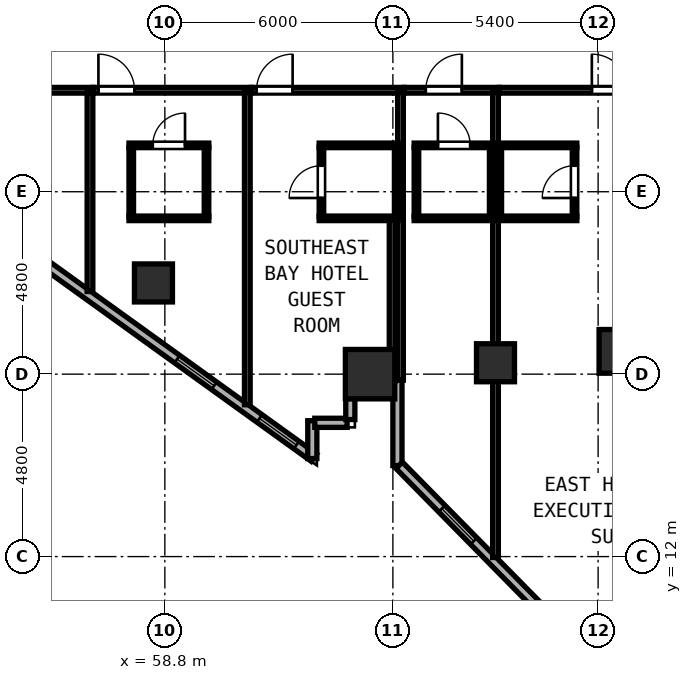
"""IFC4 building model, lengths in metres.
Left out: names, types, materials, properties, quantities, classifications, styles, units other than length and angle.
Written with IfcOpenShell. Run it as: python <this file> out.ifc"""

import sys

from ifc_helpers import new_model, si_unit, direction, frame, frame_2d, origin, origin_2d, place, context, subcontext, project, spatial, rectangle, hollow_rectangle, extrude, element, fill, save


model = new_model("IFC4")
c1 = context("Model", 3, precision=1e-05, world=origin(), true_north=direction((0.0, 1.0)))
c2 = subcontext(c1, "Body", "Model", "MODEL_VIEW")
j1 = project(units=[si_unit("LENGTHUNIT", "METRE"), si_unit("PLANEANGLEUNIT", "RADIAN")], contexts=[c1])
p1 = place(None, origin())
s1 = spatial("IfcSite", under=j1, at=p1, CompositionType="ELEMENT")
p2 = place(p1, origin())
s2 = spatial("IfcBuilding", under=s1, at=p2, CompositionType="ELEMENT")
p3 = place(p2, frame((0.0, 0.0, 39.2)))
s3 = spatial("IfcBuildingStorey", under=s2, at=p3, CompositionType="ELEMENT", Elevation=39.2)
p4 = place(p3, frame((64.2, 16.8, 0.0), z_axis=(0.0, 0.0, 1.0), x_axis=(1.0, 0.0, 0.0)))
e1 = element("IfcColumn", 1, at=p4, inside=s3, PredefinedType="COLUMN", context=c2, shape_type="SweptSolid", body=[
    extrude(hollow_rectangle(XDim=1.3, YDim=1.3, WallThickness=0.048, at=origin_2d()), origin(), (0.0, 0.0, 1.0), 3.8),
])
p5 = place(p3, frame((70.8, 17.4, 0.0), z_axis=(0.0, 0.0, 1.0), x_axis=(1.0, 0.0, 0.0)))
e2 = element("IfcColumn", 2, at=p5, inside=s3, PredefinedType="COLUMN", context=c2, shape_type="SweptSolid", body=[
    extrude(hollow_rectangle(XDim=1.15, YDim=1.15, WallThickness=0.042, at=origin_2d()), origin(), (0.0, 0.0, 1.0), 3.8),
])
for number, where, z_axis, x_axis in (
    (3, (58.5, 19.2, 0.0), (0.0, 0.0, 1.0), (1.0, 0.0, 0.0)),
    (4, (67.5, 17.1, 0.0), (0.0, 0.0, 1.0), (1.0, 0.0, 0.0)),
):
    element("IfcColumn", number, at=place(p3, frame(where, z_axis=z_axis, x_axis=x_axis)), inside=s3, PredefinedType="COLUMN", context=c2, shape_type="SweptSolid", body=[
        extrude(hollow_rectangle(XDim=1.0, YDim=1.0, WallThickness=0.038, at=origin_2d()), origin(), (0.0, 0.0, 1.0), 3.8),
    ])
p6 = place(p3, frame((53.442, 21.286, 0.0), z_axis=(0.0, 0.0, 1.0), x_axis=(0.811542842993, -0.584292917967, 0.0)))
e5 = element("IfcWall", 5, at=p6, inside=s3, PredefinedType="SOLIDWALL", context=c2, shape_type="SweptSolid", body=[
    extrude(rectangle(XDim=11.438, YDim=0.24, at=frame_2d((5.719, 0.0))), origin(), (0.0, 0.0, 1.0), 3.037),
])
p7 = place(p6, frame((1.6, 0.0, 0.85)))
e6 = element("IfcOpeningElement", 6, at=p7, cuts=e5, PredefinedType="OPENING", context=c2, shape_type="SweptSolid", body=[
    extrude(rectangle(XDim=1.2, YDim=1.85, at=frame_2d((0.6, 0.925))), frame((0.0, 0.13, 0.0), z_axis=(0.0, -1.0, 0.0), x_axis=(1.0, 0.0, 0.0)), (0.0, 0.0, 1.0), 0.26),
])
p8 = place(p6, frame((7.0, 0.0, 0.85)))
e7 = element("IfcOpeningElement", 7, at=p8, cuts=e5, PredefinedType="OPENING", context=c2, shape_type="SweptSolid", body=[
    extrude(rectangle(XDim=1.2, YDim=1.85, at=frame_2d((0.6, 0.925))), frame((0.0, 0.13, 0.0), z_axis=(0.0, -1.0, 0.0), x_axis=(1.0, 0.0, 0.0)), (0.0, 0.0, 1.0), 0.26),
])
p9 = place(p6, frame((9.669, 0.0, 0.85)))
e8 = element("IfcOpeningElement", 8, at=p9, cuts=e5, PredefinedType="OPENING", context=c2, shape_type="SweptSolid", body=[
    extrude(rectangle(XDim=1.2, YDim=1.85, at=frame_2d((0.6, 0.925))), frame((0.0, 0.13, 0.0), z_axis=(0.0, -1.0, 0.0), x_axis=(1.0, 0.0, 0.0)), (0.0, 0.0, 1.0), 0.26),
])
p10 = place(p3, frame((62.68, 14.579, 0.0), z_axis=(0.0, 0.0, 1.0), x_axis=(0.0, 1.0, 0.0)))
e9 = element("IfcWall", 9, at=p10, inside=s3, PredefinedType="SOLIDWALL", context=c2, shape_type="SweptSolid", body=[
    extrude(rectangle(XDim=0.996, YDim=0.24, at=frame_2d((0.498, 0.0))), origin(), (0.0, 0.0, 1.0), 3.54),
])
p11 = place(p3, frame((62.745, 15.52, 0.0), z_axis=(0.0, 0.0, 1.0), x_axis=(1.0, 0.0, 0.0)))
e10 = element("IfcWall", 10, at=p11, inside=s3, PredefinedType="SOLIDWALL", context=c2, shape_type="SweptSolid", body=[
    extrude(rectangle(XDim=0.85, YDim=0.24, at=frame_2d((0.425, 0.0))), origin(), (0.0, 0.0, 1.0), 3.54),
])
p12 = place(p3, frame((63.68, 15.605, 0.0), z_axis=(0.0, 0.0, 1.0), x_axis=(0.0, 1.0, 0.0)))
e11 = element("IfcWall", 11, at=p12, inside=s3, PredefinedType="SOLIDWALL", context=c2, shape_type="SweptSolid", body=[
    extrude(rectangle(XDim=0.553, YDim=0.24, at=frame_2d((0.276, 0.0))), origin(), (0.0, 0.0, 1.0), 3.54),
])
p13 = place(p3, frame((64.92, 16.64, 0.0), z_axis=(0.0, 0.0, 1.0), x_axis=(0.0, -1.0, 0.0)))
e12 = element("IfcWall", 12, at=p13, inside=s3, PredefinedType="SOLIDWALL", context=c2, shape_type="SweptSolid", body=[
    extrude(rectangle(XDim=2.246, YDim=0.24, at=frame_2d((1.123, 0.0))), origin(), (0.0, 0.0, 1.0), 3.54),
])
p14 = place(p3, frame((64.966, 14.403, 0.0), z_axis=(0.0, 0.0, 1.0), x_axis=(0.701329027825, -0.712837705744, 0.0)))
e13 = element("IfcWall", 13, at=p14, inside=s3, PredefinedType="SOLIDWALL", context=c2, shape_type="SweptSolid", body=[
    extrude(rectangle(XDim=10.458, YDim=0.24, at=frame_2d((5.229, 0.0))), origin(), (0.0, 0.0, 1.0), 3.54),
])
p15 = place(p14, frame((1.6, 0.0, 0.85)))
e14 = element("IfcOpeningElement", 14, at=p15, cuts=e13, PredefinedType="OPENING", context=c2, shape_type="SweptSolid", body=[
    extrude(rectangle(XDim=1.2, YDim=1.85, at=frame_2d((0.6, 0.925))), frame((0.0, 0.13, 0.0), z_axis=(0.0, -1.0, 0.0), x_axis=(1.0, 0.0, 0.0)), (0.0, 0.0, 1.0), 0.26),
])
p16 = place(p14, frame((7.0, 0.0, 0.85)))
e15 = element("IfcOpeningElement", 15, at=p16, cuts=e13, PredefinedType="OPENING", context=c2, shape_type="SweptSolid", body=[
    extrude(rectangle(XDim=1.2, YDim=1.85, at=frame_2d((0.6, 0.925))), frame((0.0, 0.13, 0.0), z_axis=(0.0, -1.0, 0.0), x_axis=(1.0, 0.0, 0.0)), (0.0, 0.0, 1.0), 0.26),
])
p17 = place(p3, frame((52.882, 24.27, 0.0), z_axis=(0.0, 0.0, 1.0), x_axis=(1.0, 0.0, 0.0)))
e16 = element("IfcWall", 16, at=p17, inside=s3, PredefinedType="PARTITIONING", context=c2, shape_type="SweptSolid", body=[
    extrude(rectangle(XDim=4.028, YDim=0.15, at=frame_2d((2.014, 0.0))), origin(), (0.0, 0.0, 1.0), 3.54),
])
p18 = place(p17, frame((2.328, 0.0, 0.0), z_axis=(0.0, 0.0, 1.0), x_axis=(-1.0, 0.0, 0.0)))
e17 = element("IfcOpeningElement", 17, at=p18, cuts=e16, PredefinedType="OPENING", context=c2, shape_type="SweptSolid", body=[
    extrude(rectangle(XDim=0.95, YDim=2.12, at=frame_2d((0.475, 1.06))), frame((0.0, 0.085, 0.0), z_axis=(0.0, -1.0, 0.0), x_axis=(1.0, 0.0, 0.0)), (0.0, 0.0, 1.0), 0.17),
])
p19 = place(p3, frame((56.83, 18.976, 0.0), z_axis=(0.0, 0.0, 1.0), x_axis=(0.0, 1.0, 0.0)))
e18 = element("IfcWall", 18, at=p19, inside=s3, PredefinedType="PARTITIONING", context=c2, shape_type="SweptSolid", body=[
    extrude(rectangle(XDim=5.234, YDim=0.15, at=frame_2d((2.617, 0.0))), origin(), (0.0, 0.0, 1.0), 3.54),
])
p20 = place(p3, frame((56.912, 24.27, 0.0), z_axis=(0.0, 0.0, 1.0), x_axis=(1.0, 0.0, 0.0)))
e19 = element("IfcWall", 19, at=p20, inside=s3, PredefinedType="PARTITIONING", context=c2, shape_type="SweptSolid", body=[
    extrude(rectangle(XDim=4.158, YDim=0.15, at=frame_2d((2.079, 0.0))), origin(), (0.0, 0.0, 1.0), 3.54),
])
p21 = place(p20, frame((1.09, 0.0, 0.0), z_axis=(0.0, 0.0, 1.0), x_axis=(-1.0, 0.0, 0.0)))
e20 = element("IfcOpeningElement", 20, at=p21, cuts=e19, PredefinedType="OPENING", context=c2, shape_type="SweptSolid", body=[
    extrude(rectangle(XDim=0.95, YDim=2.15, at=frame_2d((0.475, 1.075))), frame((0.0, 0.085, 0.0), z_axis=(0.0, -1.0, 0.0), x_axis=(1.0, 0.0, 0.0)), (0.0, 0.0, 1.0), 0.17),
])
p22 = place(p3, frame((60.97, 15.995, 0.0), z_axis=(0.0, 0.0, 1.0), x_axis=(0.0, 1.0, 0.0)))
e21 = element("IfcWall", 21, at=p22, inside=s3, PredefinedType="PARTITIONING", context=c2, shape_type="SweptSolid", body=[
    extrude(rectangle(XDim=8.215, YDim=0.15, at=frame_2d((4.107, 0.0))), origin(), (0.0, 0.0, 1.0), 3.54),
])
p23 = place(p3, frame((57.856, 22.82, 0.0), z_axis=(0.0, 0.0, 1.0), x_axis=(1.0, 0.0, 0.0)))
e22 = element("IfcWall", 22, at=p23, inside=s3, PredefinedType="PARTITIONING", context=c2, shape_type="SweptSolid", body=[
    extrude(rectangle(XDim=2.1, YDim=0.12, at=frame_2d((1.05, 0.0))), origin(), (0.0, 0.0, 1.0), 3.54),
])
p24 = place(p23, frame((1.475, 0.0, 0.0), z_axis=(0.0, 0.0, 1.0), x_axis=(-1.0, 0.0, 0.0)))
e23 = element("IfcOpeningElement", 23, at=p24, cuts=e22, PredefinedType="OPENING", context=c2, shape_type="SweptSolid", body=[
    extrude(rectangle(XDim=0.85, YDim=2.1, at=frame_2d((0.425, 1.05))), frame((0.0, 0.07, 0.0), z_axis=(0.0, -1.0, 0.0), x_axis=(1.0, 0.0, 0.0)), (0.0, 0.0, 1.0), 0.14),
])
p25 = place(p3, frame((57.856, 20.9, 0.0), z_axis=(0.0, 0.0, 1.0), x_axis=(1.0, 0.0, 0.0)))
e24 = element("IfcWall", 24, at=p25, inside=s3, PredefinedType="PARTITIONING", context=c2, shape_type="SweptSolid", body=[
    extrude(rectangle(XDim=2.1, YDim=0.12, at=frame_2d((1.05, 0.0))), origin(), (0.0, 0.0, 1.0), 3.54),
])
for number, where, z_axis, x_axis in (
    (25, (57.916, 20.945, 0.0), (0.0, 0.0, 1.0), (0.0, 1.0, 0.0)),
    (26, (59.896, 20.945, 0.0), (0.0, 0.0, 1.0), (0.0, 1.0, 0.0)),
):
    element("IfcWall", number, at=place(p3, frame(where, z_axis=z_axis, x_axis=x_axis)), inside=s3, PredefinedType="PARTITIONING", context=c2, shape_type="SweptSolid", body=[
        extrude(rectangle(XDim=1.83, YDim=0.12, at=frame_2d((0.915, 0.0))), origin(), (0.0, 0.0, 1.0), 3.54),
    ])
p26 = place(p3, frame((61.072, 24.27, 0.0), z_axis=(0.0, 0.0, 1.0), x_axis=(1.0, 0.0, 0.0)))
e27 = element("IfcWall", 27, at=p26, inside=s3, PredefinedType="PARTITIONING", context=c2, shape_type="SweptSolid", body=[
    extrude(rectangle(XDim=4.028, YDim=0.15, at=frame_2d((2.014, 0.0))), origin(), (0.0, 0.0, 1.0), 3.54),
])
p27 = place(p26, frame((1.09, 0.0, 0.0), z_axis=(0.0, 0.0, 1.0), x_axis=(-1.0, 0.0, 0.0)))
e28 = element("IfcOpeningElement", 28, at=p27, cuts=e27, PredefinedType="OPENING", context=c2, shape_type="SweptSolid", body=[
    extrude(rectangle(XDim=0.95, YDim=2.15, at=frame_2d((0.475, 1.075))), frame((0.0, 0.085, 0.0), z_axis=(0.0, -1.0, 0.0), x_axis=(1.0, 0.0, 0.0)), (0.0, 0.0, 1.0), 0.17),
])
p28 = place(p3, frame((65.0, 16.642, 0.0), z_axis=(0.0, 0.0, 1.0), x_axis=(0.0, 1.0, 0.0)))
e29 = element("IfcWall", 29, at=p28, inside=s3, PredefinedType="PARTITIONING", context=c2, shape_type="SweptSolid", body=[
    extrude(rectangle(XDim=7.568, YDim=0.15, at=frame_2d((3.784, 0.0))), origin(), (0.0, 0.0, 1.0), 3.54),
])
for number, where, z_axis, x_axis in (
    (30, (62.86, 22.82, 0.0), (0.0, 0.0, 1.0), (1.0, 0.0, 0.0)),
    (31, (62.86, 20.9, 0.0), (0.0, 0.0, 1.0), (1.0, 0.0, 0.0)),
):
    element("IfcWall", number, at=place(p3, frame(where, z_axis=z_axis, x_axis=x_axis)), inside=s3, PredefinedType="PARTITIONING", context=c2, shape_type="SweptSolid", body=[
        extrude(rectangle(XDim=2.08, YDim=0.12, at=frame_2d((1.04, 0.0))), origin(), (0.0, 0.0, 1.0), 3.54),
    ])
p29 = place(p3, frame((62.92, 20.945, 0.0), z_axis=(0.0, 0.0, 1.0), x_axis=(0.0, 1.0, 0.0)))
e32 = element("IfcWall", 32, at=p29, inside=s3, PredefinedType="PARTITIONING", context=c2, shape_type="SweptSolid", body=[
    extrude(rectangle(XDim=1.83, YDim=0.12, at=frame_2d((0.915, 0.0))), origin(), (0.0, 0.0, 1.0), 3.54),
])
p30 = place(p29, frame((1.34, 0.0, 0.0), z_axis=(0.0, 0.0, 1.0), x_axis=(-1.0, 0.0, 0.0)))
e33 = element("IfcOpeningElement", 33, at=p30, cuts=e32, PredefinedType="OPENING", context=c2, shape_type="SweptSolid", body=[
    extrude(rectangle(XDim=0.85, YDim=2.1, at=frame_2d((0.425, 1.05))), frame((0.0, 0.07, 0.0), z_axis=(0.0, -1.0, 0.0), x_axis=(1.0, 0.0, 0.0)), (0.0, 0.0, 1.0), 0.14),
])
p31 = place(p3, frame((64.9, 20.945, 0.0), z_axis=(0.0, 0.0, 1.0), x_axis=(0.0, 1.0, 0.0)))
e34 = element("IfcWall", 34, at=p31, inside=s3, PredefinedType="PARTITIONING", context=c2, shape_type="SweptSolid", body=[
    extrude(rectangle(XDim=1.83, YDim=0.12, at=frame_2d((0.915, 0.0))), origin(), (0.0, 0.0, 1.0), 3.54),
])
p32 = place(p3, frame((65.102, 24.27, 0.0), z_axis=(0.0, 0.0, 1.0), x_axis=(1.0, 0.0, 0.0)))
e35 = element("IfcWall", 35, at=p32, inside=s3, PredefinedType="PARTITIONING", context=c2, shape_type="SweptSolid", body=[
    extrude(rectangle(XDim=2.498, YDim=0.15, at=frame_2d((1.249, 0.0))), origin(), (0.0, 0.0, 1.0), 3.54),
])
p33 = place(p32, frame((1.513, 0.0, 0.0), z_axis=(0.0, 0.0, 1.0), x_axis=(-1.0, 0.0, 0.0)))
e36 = element("IfcOpeningElement", 36, at=p33, cuts=e35, PredefinedType="OPENING", context=c2, shape_type="SweptSolid", body=[
    extrude(rectangle(XDim=0.95, YDim=2.15, at=frame_2d((0.475, 1.075))), frame((0.0, 0.085, 0.0), z_axis=(0.0, -1.0, 0.0), x_axis=(1.0, 0.0, 0.0)), (0.0, 0.0, 1.0), 0.17),
])
p34 = place(p3, frame((67.5, 11.977, 0.0), z_axis=(0.0, 0.0, 1.0), x_axis=(0.0, 1.0, 0.0)))
e37 = element("IfcWall", 37, at=p34, inside=s3, PredefinedType="PARTITIONING", context=c2, shape_type="SweptSolid", body=[
    extrude(rectangle(XDim=12.233, YDim=0.15, at=frame_2d((6.117, 0.0))), origin(), (0.0, 0.0, 1.0), 3.54),
])
p35 = place(p3, frame((64.78, 16.612, 0.0), z_axis=(0.0, 0.0, 1.0), x_axis=(0.0, 1.0, 0.0)))
e38 = element("IfcWall", 38, at=p35, inside=s3, PredefinedType="PARTITIONING", context=c2, shape_type="SweptSolid", body=[
    extrude(rectangle(XDim=4.243, YDim=0.15, at=frame_2d((2.122, 0.0))), origin(), (0.0, 0.0, 1.0), 3.54),
])
p36 = place(p3, frame((65.36, 22.82, 0.0), z_axis=(0.0, 0.0, 1.0), x_axis=(1.0, 0.0, 0.0)))
e39 = element("IfcWall", 39, at=p36, inside=s3, PredefinedType="PARTITIONING", context=c2, shape_type="SweptSolid", body=[
    extrude(rectangle(XDim=2.08, YDim=0.12, at=frame_2d((1.04, 0.0))), origin(), (0.0, 0.0, 1.0), 3.54),
])
p37 = place(p36, frame((1.475, 0.0, 0.0), z_axis=(0.0, 0.0, 1.0), x_axis=(-1.0, 0.0, 0.0)))
e40 = element("IfcOpeningElement", 40, at=p37, cuts=e39, PredefinedType="OPENING", context=c2, shape_type="SweptSolid", body=[
    extrude(rectangle(XDim=0.85, YDim=2.1, at=frame_2d((0.425, 1.05))), frame((0.0, 0.07, 0.0), z_axis=(0.0, -1.0, 0.0), x_axis=(1.0, 0.0, 0.0)), (0.0, 0.0, 1.0), 0.14),
])
p38 = place(p3, frame((65.36, 20.9, 0.0), z_axis=(0.0, 0.0, 1.0), x_axis=(1.0, 0.0, 0.0)))
e41 = element("IfcWall", 41, at=p38, inside=s3, PredefinedType="PARTITIONING", context=c2, shape_type="SweptSolid", body=[
    extrude(rectangle(XDim=2.08, YDim=0.12, at=frame_2d((1.04, 0.0))), origin(), (0.0, 0.0, 1.0), 3.54),
])
for number, where, z_axis, x_axis in (
    (42, (65.42, 20.945, 0.0), (0.0, 0.0, 1.0), (0.0, 1.0, 0.0)),
    (43, (67.4, 20.945, 0.0), (0.0, 0.0, 1.0), (0.0, 1.0, 0.0)),
):
    element("IfcWall", number, at=place(p3, frame(where, z_axis=z_axis, x_axis=x_axis)), inside=s3, PredefinedType="PARTITIONING", context=c2, shape_type="SweptSolid", body=[
        extrude(rectangle(XDim=1.83, YDim=0.12, at=frame_2d((0.915, 0.0))), origin(), (0.0, 0.0, 1.0), 3.54),
    ])
p39 = place(p3, frame((67.602, 24.27, 0.0), z_axis=(0.0, 0.0, 1.0), x_axis=(1.0, 0.0, 0.0)))
e44 = element("IfcWall", 44, at=p39, inside=s3, PredefinedType="PARTITIONING", context=c2, shape_type="SweptSolid", body=[
    extrude(rectangle(XDim=6.453, YDim=0.15, at=frame_2d((3.227, 0.0))), origin(), (0.0, 0.0, 1.0), 3.54),
])
p40 = place(p39, frame((3.383, 0.0, 0.0), z_axis=(0.0, 0.0, 1.0), x_axis=(-1.0, 0.0, 0.0)))
e45 = element("IfcOpeningElement", 45, at=p40, cuts=e44, PredefinedType="OPENING", context=c2, shape_type="SweptSolid", body=[
    extrude(rectangle(XDim=0.95, YDim=2.18, at=frame_2d((0.475, 1.09))), frame((0.0, 0.085, 0.0), z_axis=(0.0, -1.0, 0.0), x_axis=(1.0, 0.0, 0.0)), (0.0, 0.0, 1.0), 0.17),
])
for number, where, z_axis, x_axis in (
    (46, (67.56, 22.82, 0.0), (0.0, 0.0, 1.0), (1.0, 0.0, 0.0)),
    (47, (67.56, 20.9, 0.0), (0.0, 0.0, 1.0), (1.0, 0.0, 0.0)),
):
    element("IfcWall", number, at=place(p3, frame(where, z_axis=z_axis, x_axis=x_axis)), inside=s3, PredefinedType="PARTITIONING", context=c2, shape_type="SweptSolid", body=[
        extrude(rectangle(XDim=2.08, YDim=0.12, at=frame_2d((1.04, 0.0))), origin(), (0.0, 0.0, 1.0), 3.54),
    ])
p41 = place(p3, frame((67.6, 20.945, 0.0), z_axis=(0.0, 0.0, 1.0), x_axis=(0.0, 1.0, 0.0)))
e48 = element("IfcWall", 48, at=p41, inside=s3, PredefinedType="PARTITIONING", context=c2, shape_type="SweptSolid", body=[
    extrude(rectangle(XDim=1.83, YDim=0.12, at=frame_2d((0.915, 0.0))), origin(), (0.0, 0.0, 1.0), 3.54),
])
p42 = place(p3, frame((69.58, 20.945, 0.0), z_axis=(0.0, 0.0, 1.0), x_axis=(0.0, 1.0, 0.0)))
e49 = element("IfcWall", 49, at=p42, inside=s3, PredefinedType="PARTITIONING", context=c2, shape_type="SweptSolid", body=[
    extrude(rectangle(XDim=1.83, YDim=0.12, at=frame_2d((0.915, 0.0))), origin(), (0.0, 0.0, 1.0), 3.54),
])
p43 = place(p42, frame((0.49, 0.0, 0.0)))
e50 = element("IfcOpeningElement", 50, at=p43, cuts=e49, PredefinedType="OPENING", context=c2, shape_type="SweptSolid", body=[
    extrude(rectangle(XDim=0.85, YDim=2.1, at=frame_2d((0.425, 1.05))), frame((0.0, 0.07, 0.0), z_axis=(0.0, -1.0, 0.0), x_axis=(1.0, 0.0, 0.0)), (0.0, 0.0, 1.0), 0.14),
])
p44 = place(p8, origin())
e51 = element("IfcWindow", 51, at=p44, inside=s3, PartitioningType="SINGLE_PANEL", PredefinedType="WINDOW", context=c2, shape_type="SweptSolid", body=[
    extrude(rectangle(XDim=1.2, YDim=1.85, at=frame_2d((0.6, 0.925))), frame((0.0, 0.03, 0.0), z_axis=(0.0, -1.0, 0.0), x_axis=(1.0, 0.0, 0.0)), (0.0, 0.0, 1.0), 0.06),
])
fill(e7, e51)
p45 = place(p15, origin())
e52 = element("IfcWindow", 52, at=p45, inside=s3, PartitioningType="SINGLE_PANEL", PredefinedType="WINDOW", context=c2, shape_type="SweptSolid", body=[
    extrude(rectangle(XDim=1.2, YDim=1.85, at=frame_2d((0.6, 0.925))), frame((0.0, 0.03, 0.0), z_axis=(0.0, -1.0, 0.0), x_axis=(1.0, 0.0, 0.0)), (0.0, 0.0, 1.0), 0.06),
])
fill(e14, e52)
p46 = place(p21, origin())
e53 = element("IfcDoor", 53, at=p46, inside=s3, OperationType="SINGLE_SWING_RIGHT", PredefinedType="DOOR", context=c2, shape_type="SweptSolid", body=[
    extrude(rectangle(XDim=0.95, YDim=2.15, at=frame_2d((0.475, 1.075))), frame((0.0, 0.025, 0.0), z_axis=(0.0, -1.0, 0.0), x_axis=(1.0, 0.0, 0.0)), (0.0, 0.0, 1.0), 0.05),
])
fill(e20, e53)
p47 = place(p24, origin())
e54 = element("IfcDoor", 54, at=p47, inside=s3, OperationType="SINGLE_SWING_LEFT", PredefinedType="DOOR", context=c2, shape_type="SweptSolid", body=[
    extrude(rectangle(XDim=0.85, YDim=2.1, at=frame_2d((0.425, 1.05))), frame((0.0, 0.025, 0.0), z_axis=(0.0, -1.0, 0.0), x_axis=(1.0, 0.0, 0.0)), (0.0, 0.0, 1.0), 0.05),
])
fill(e23, e54)
p48 = place(p27, origin())
e55 = element("IfcDoor", 55, at=p48, inside=s3, OperationType="SINGLE_SWING_LEFT", PredefinedType="DOOR", context=c2, shape_type="SweptSolid", body=[
    extrude(rectangle(XDim=0.95, YDim=2.15, at=frame_2d((0.475, 1.075))), frame((0.0, 0.025, 0.0), z_axis=(0.0, -1.0, 0.0), x_axis=(1.0, 0.0, 0.0)), (0.0, 0.0, 1.0), 0.05),
])
fill(e28, e55)
p49 = place(p30, origin())
e56 = element("IfcDoor", 56, at=p49, inside=s3, OperationType="SINGLE_SWING_RIGHT", PredefinedType="DOOR", context=c2, shape_type="SweptSolid", body=[
    extrude(rectangle(XDim=0.85, YDim=2.1, at=frame_2d((0.425, 1.05))), frame((0.0, 0.025, 0.0), z_axis=(0.0, -1.0, 0.0), x_axis=(1.0, 0.0, 0.0)), (0.0, 0.0, 1.0), 0.05),
])
fill(e33, e56)
p50 = place(p33, origin())
e57 = element("IfcDoor", 57, at=p50, inside=s3, OperationType="SINGLE_SWING_LEFT", PredefinedType="DOOR", context=c2, shape_type="SweptSolid", body=[
    extrude(rectangle(XDim=0.95, YDim=2.15, at=frame_2d((0.475, 1.075))), frame((0.0, 0.025, 0.0), z_axis=(0.0, -1.0, 0.0), x_axis=(1.0, 0.0, 0.0)), (0.0, 0.0, 1.0), 0.05),
])
fill(e36, e57)
p51 = place(p37, origin())
e58 = element("IfcDoor", 58, at=p51, inside=s3, OperationType="SINGLE_SWING_RIGHT", PredefinedType="DOOR", context=c2, shape_type="SweptSolid", body=[
    extrude(rectangle(XDim=0.85, YDim=2.1, at=frame_2d((0.425, 1.05))), frame((0.0, 0.025, 0.0), z_axis=(0.0, -1.0, 0.0), x_axis=(1.0, 0.0, 0.0)), (0.0, 0.0, 1.0), 0.05),
])
fill(e40, e58)
p52 = place(p40, origin())
e59 = element("IfcDoor", 59, at=p52, inside=s3, OperationType="SINGLE_SWING_RIGHT", PredefinedType="DOOR", context=c2, shape_type="SweptSolid", body=[
    extrude(rectangle(XDim=0.95, YDim=2.18, at=frame_2d((0.475, 1.09))), frame((0.0, 0.025, 0.0), z_axis=(0.0, -1.0, 0.0), x_axis=(1.0, 0.0, 0.0)), (0.0, 0.0, 1.0), 0.05),
])
fill(e45, e59)
p53 = place(p43, origin())
e60 = element("IfcDoor", 60, at=p53, inside=s3, OperationType="SINGLE_SWING_LEFT", PredefinedType="DOOR", context=c2, shape_type="SweptSolid", body=[
    extrude(rectangle(XDim=0.85, YDim=2.1, at=frame_2d((0.425, 1.05))), frame((0.0, 0.025, 0.0), z_axis=(0.0, -1.0, 0.0), x_axis=(1.0, 0.0, 0.0)), (0.0, 0.0, 1.0), 0.05),
])
fill(e50, e60)
p54 = place(p9, origin())
e61 = element("IfcWindow", 61, at=p54, inside=s3, PartitioningType="SINGLE_PANEL", PredefinedType="WINDOW", context=c2, shape_type="SweptSolid", body=[
    extrude(rectangle(XDim=1.2, YDim=1.85, at=frame_2d((0.6, 0.925))), frame((0.0, 0.03, 0.0), z_axis=(0.0, -1.0, 0.0), x_axis=(1.0, 0.0, 0.0)), (0.0, 0.0, 1.0), 0.06),
])
fill(e8, e61)
save(model, sys.argv[1])
